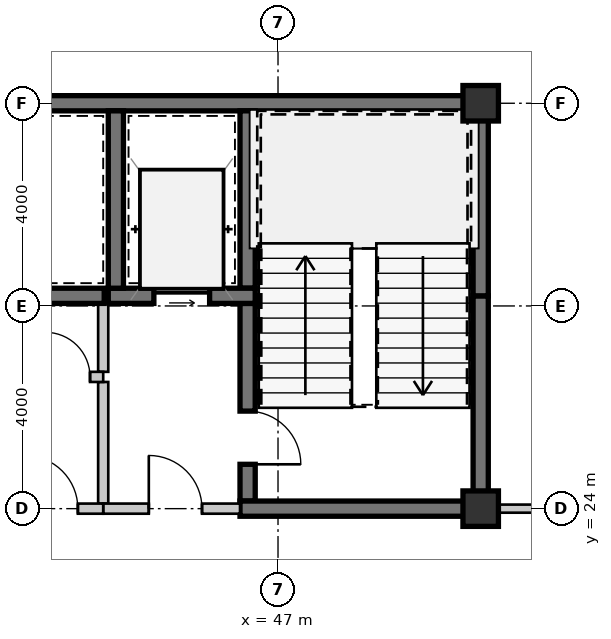
"""IFC4 building model, lengths in metres.
Left out: names, types, materials, properties, quantities, classifications, styles, units other than length and angle.
Written with IfcOpenShell. Run it as: python <this file> out.ifc"""

import sys

from ifc_helpers import new_model, si_unit, direction, frame, frame_2d, origin, origin_2d, place, context, subcontext, project, spatial, rectangle, extrude, source, transform, mapped, element, fill, save


model = new_model("IFC4")
c1 = context("Model", 3, precision=1e-05, world=origin(), true_north=direction((0.0, 1.0)))
c2 = subcontext(c1, "Body", "Model", "MODEL_VIEW")
j1 = project(units=[si_unit("LENGTHUNIT", "METRE"), si_unit("PLANEANGLEUNIT", "RADIAN")], contexts=[c1])
p1 = place(None, origin())
s1 = spatial("IfcSite", under=j1, at=p1, CompositionType="ELEMENT")
p2 = place(p1, origin())
s2 = spatial("IfcBuilding", under=s1, at=p2, CompositionType="ELEMENT")
p3 = place(p2, frame((0.0, 0.0, 65.1)))
s3 = spatial("IfcBuildingStorey", under=s2, at=p3, CompositionType="ELEMENT", Elevation=65.1)
m1 = source(origin(), c2, "Body", "SweptSolid", [
    extrude(rectangle(XDim=0.7, YDim=0.7, at=origin_2d()), origin(), (0.0, 0.0, 1.0), 3.15),
])
for number, where, z_axis, x_axis in (
    (1, (51.0, 24.0, 0.0), (0.0, 0.0, 1.0), (1.0, 0.0, 0.0)),
    (2, (51.0, 32.0, 0.0), (0.0, 0.0, 1.0), (1.0, 0.0, 0.0)),
):
    element("IfcColumn", number, at=place(p3, frame(where, z_axis=z_axis, x_axis=x_axis)), inside=s3, PredefinedType="COLUMN", context=c2, shape_type="MappedRepresentation", body=[
        mapped(m1, transform((0.0, 0.0, 0.0), scale=1.0)),
    ])
m2 = source(origin(), c2, "Body", "SweptSolid", [
    extrude(rectangle(XDim=11.95, YDim=0.3, at=frame_2d((5.975, 0.0))), origin(), (0.0, 0.0, 1.0), 2.93),
])
p4 = place(p3, frame((39.2, 32.0, 0.0), z_axis=(0.0, 0.0, 1.0), x_axis=(1.0, 0.0, 0.0)))
e3 = element("IfcWall", 3, at=p4, inside=s3, PredefinedType="SHEAR", context=c2, shape_type="MappedRepresentation", body=[
    mapped(m2, transform((0.0, 0.0, 0.0), scale=1.0)),
])
m3 = source(origin(), c2, "Body", "SweptSolid", [
    extrude(rectangle(XDim=4.05, YDim=0.3, at=frame_2d((2.025, 0.0))), origin(), (0.0, 0.0, 1.0), 2.93),
])
p5 = place(p3, frame((51.0, 24.15, 0.0), z_axis=(0.0, 0.0, 1.0), x_axis=(0.0, 1.0, 0.0)))
e4 = element("IfcWall", 4, at=p5, inside=s3, PredefinedType="SHEAR", context=c2, shape_type="MappedRepresentation", body=[
    mapped(m3, transform((0.0, 0.0, 0.0), scale=1.0)),
])
m4 = source(origin(), c2, "Body", "SweptSolid", [
    extrude(rectangle(XDim=3.65, YDim=0.3, at=frame_2d((1.825, 0.0))), origin(), (0.0, 0.0, 1.0), 2.93),
])
p6 = place(p3, frame((51.0, 28.2, 0.0), z_axis=(0.0, 0.0, 1.0), x_axis=(0.0, 1.0, 0.0)))
e5 = element("IfcWall", 5, at=p6, inside=s3, PredefinedType="SHEAR", context=c2, shape_type="MappedRepresentation", body=[
    mapped(m4, transform((0.0, 0.0, 0.0), scale=1.0)),
])
m5 = source(origin(), c2, "Body", "SweptSolid", [
    extrude(rectangle(XDim=3.5, YDim=0.3, at=frame_2d((1.75, 0.0))), origin(), (0.0, 0.0, 1.0), 2.93),
])
p7 = place(p3, frame((46.4, 31.85, 0.0), z_axis=(0.0, 0.0, 1.0), x_axis=(0.0, -1.0, 0.0)))
e6 = element("IfcWall", 6, at=p7, inside=s3, PredefinedType="SHEAR", context=c2, shape_type="MappedRepresentation", body=[
    mapped(m5, transform((0.0, 0.0, 0.0), scale=1.0)),
])
m6 = source(origin(), c2, "Body", "SweptSolid", [
    extrude(rectangle(XDim=3.9, YDim=0.3, at=frame_2d((1.95, 0.0))), origin(), (0.0, 0.0, 1.0), 2.93),
])
p8 = place(p3, frame((46.4, 28.05, 0.0), z_axis=(0.0, 0.0, 1.0), x_axis=(0.0, -1.0, 0.0)))
e7 = element("IfcWall", 7, at=p8, inside=s3, PredefinedType="SHEAR", context=c2, shape_type="MappedRepresentation", body=[
    mapped(m6, transform((0.0, 0.0, 0.0), scale=1.0)),
])
m7 = source(origin(), c2, "Body", "SweptSolid", [
    extrude(rectangle(XDim=1.05, YDim=2.1, at=frame_2d((0.525, 1.05))), frame((0.0, 0.16, 0.0), z_axis=(0.0, -1.0, 0.0), x_axis=(1.0, 0.0, 0.0)), (0.0, 0.0, 1.0), 0.32),
])
p9 = place(p8, frame((2.125, 0.0, 0.0)))
e8 = element("IfcOpeningElement", 8, at=p9, cuts=e7, PredefinedType="OPENING", context=c2, shape_type="MappedRepresentation", body=[
    mapped(m7, transform((0.0, 0.0, 0.0), scale=1.0)),
])
m8 = source(origin(), c2, "Body", "SweptSolid", [
    extrude(rectangle(XDim=4.9, YDim=0.3, at=frame_2d((2.45, 0.0))), origin(), (0.0, 0.0, 1.0), 2.93),
])
p10 = place(p3, frame((46.25, 24.0, 0.0), z_axis=(0.0, 0.0, 1.0), x_axis=(1.0, 0.0, 0.0)))
e9 = element("IfcWall", 9, at=p10, inside=s3, PredefinedType="SHEAR", context=c2, shape_type="MappedRepresentation", body=[
    mapped(m8, transform((0.0, 0.0, 0.0), scale=1.0)),
])
m9 = source(origin(), c2, "Body", "SweptSolid", [
    extrude(rectangle(XDim=2.9, YDim=0.3, at=frame_2d((1.45, 0.0))), origin(), (0.0, 0.0, 1.0), 2.93),
])
p11 = place(p3, frame((43.65, 28.2, 0.0), z_axis=(0.0, 0.0, 1.0), x_axis=(1.0, 0.0, 0.0)))
e10 = element("IfcWall", 10, at=p11, inside=s3, PredefinedType="SHEAR", context=c2, shape_type="MappedRepresentation", body=[
    mapped(m9, transform((0.0, 0.0, 0.0), scale=1.0)),
])
m10 = source(origin(), c2, "Body", "SweptSolid", [
    extrude(rectangle(XDim=1.1, YDim=2.15, at=frame_2d((0.55, 1.075))), frame((0.0, 0.16, 0.0), z_axis=(0.0, -1.0, 0.0), x_axis=(1.0, 0.0, 0.0)), (0.0, 0.0, 1.0), 0.32),
])
p12 = place(p11, frame((0.9, 0.0, 0.0)))
e11 = element("IfcOpeningElement", 11, at=p12, cuts=e10, PredefinedType="OPENING", context=c2, shape_type="MappedRepresentation", body=[
    mapped(m10, transform((0.0, 0.0, 0.0), scale=1.0)),
])
p13 = place(p3, frame((43.8, 31.85, 0.0), z_axis=(0.0, 0.0, 1.0), x_axis=(0.0, -1.0, 0.0)))
e12 = element("IfcWall", 12, at=p13, inside=s3, PredefinedType="SHEAR", context=c2, shape_type="MappedRepresentation", body=[
    mapped(m5, transform((0.0, 0.0, 0.0), scale=1.0)),
])
m11 = source(origin(), c2, "Body", "SweptSolid", [
    extrude(rectangle(XDim=2.4, YDim=0.2, at=frame_2d((1.2, 0.0))), origin(), (0.0, 0.0, 1.0), 2.93),
])
p14 = place(p3, frame((43.55, 26.5, 0.0), z_axis=(0.0, 0.0, 1.0), x_axis=(0.0, -1.0, 0.0)))
e13 = element("IfcWall", 13, at=p14, inside=s3, PredefinedType="SOLIDWALL", context=c2, shape_type="MappedRepresentation", body=[
    mapped(m11, transform((0.0, 0.0, 0.0), scale=1.0)),
])
m12 = source(origin(), c2, "Body", "SweptSolid", [
    extrude(rectangle(XDim=1.35, YDim=0.2, at=frame_2d((0.675, 0.0))), origin(), (0.0, 0.0, 1.0), 2.93),
])
p15 = place(p3, frame((43.55, 28.05, 0.0), z_axis=(0.0, 0.0, 1.0), x_axis=(0.0, -1.0, 0.0)))
e14 = element("IfcWall", 14, at=p15, inside=s3, PredefinedType="SOLIDWALL", context=c2, shape_type="MappedRepresentation", body=[
    mapped(m12, transform((0.0, 0.0, 0.0), scale=1.0)),
])
m13 = source(origin(), c2, "Body", "SweptSolid", [
    extrude(rectangle(XDim=2.7, YDim=0.2, at=frame_2d((1.35, 0.0))), origin(), (0.0, 0.0, 1.0), 2.397),
])
p16 = place(p3, frame((43.55, 24.0, 0.0), z_axis=(0.0, 0.0, 1.0), x_axis=(1.0, 0.0, 0.0)))
e15 = element("IfcWall", 15, at=p16, inside=s3, PredefinedType="SOLIDWALL", context=c2, shape_type="MappedRepresentation", body=[
    mapped(m13, transform((0.0, 0.0, 0.0), scale=1.0)),
])
m14 = source(origin(), c2, "Body", "SweptSolid", [
    extrude(rectangle(XDim=1.05, YDim=2.1, at=frame_2d((0.525, 1.05))), frame((0.0, 0.11, 0.0), z_axis=(0.0, -1.0, 0.0), x_axis=(1.0, 0.0, 0.0)), (0.0, 0.0, 1.0), 0.22),
])
p17 = place(p16, frame((0.9, 0.0, 0.0)))
e16 = element("IfcOpeningElement", 16, at=p17, cuts=e15, PredefinedType="OPENING", context=c2, shape_type="MappedRepresentation", body=[
    mapped(m14, transform((0.0, 0.0, 0.0), scale=1.0)),
])
m15 = source(origin(), c2, "Body", "SweptSolid", [
    extrude(rectangle(XDim=1.44, YDim=0.3, at=frame_2d((0.72, 0.0))), origin(), (0.0, 0.0, 1.0), 2.93),
])
p18 = place(p3, frame((42.13, 28.2, 0.0), z_axis=(0.0, 0.0, 1.0), x_axis=(1.0, 0.0, 0.0)))
e17 = element("IfcWall", 17, at=p18, inside=s3, PredefinedType="SHEAR", context=c2, shape_type="MappedRepresentation", body=[
    mapped(m15, transform((0.0, 0.0, 0.0), scale=1.0)),
])
m16 = source(origin(), c2, "Body", "SweptSolid", [
    extrude(rectangle(XDim=1.25, YDim=0.2, at=frame_2d((0.625, 0.0))), origin(), (0.0, 0.0, 1.0), 2.93),
])
p19 = place(p3, frame((42.3, 26.6, 0.0), z_axis=(0.0, 0.0, 1.0), x_axis=(1.0, 0.0, 0.0)))
e18 = element("IfcWall", 18, at=p19, inside=s3, PredefinedType="SOLIDWALL", context=c2, shape_type="MappedRepresentation", body=[
    mapped(m16, transform((0.0, 0.0, 0.0), scale=1.0)),
])
m17 = source(origin(), c2, "Body", "SweptSolid", [
    extrude(rectangle(XDim=0.88, YDim=2.1, at=frame_2d((0.44, 1.05))), frame((0.0, 0.11, 0.0), z_axis=(0.0, -1.0, 0.0), x_axis=(1.0, 0.0, 0.0)), (0.0, 0.0, 1.0), 0.22),
])
p20 = place(p19, frame((0.11, 0.0, 0.0)))
e19 = element("IfcOpeningElement", 19, at=p20, cuts=e18, PredefinedType="OPENING", context=c2, shape_type="MappedRepresentation", body=[
    mapped(m17, transform((0.0, 0.0, 0.0), scale=1.0)),
])
m18 = source(origin(), c2, "Body", "SweptSolid", [
    extrude(rectangle(XDim=2.05, YDim=0.2, at=frame_2d((1.025, 0.0))), origin(), (0.0, 0.0, 1.0), 2.397),
])
p21 = place(p3, frame((43.55, 24.0, 0.0), z_axis=(0.0, 0.0, 1.0), x_axis=(-1.0, 0.0, 0.0)))
e20 = element("IfcWall", 20, at=p21, inside=s3, PredefinedType="SOLIDWALL", context=c2, shape_type="MappedRepresentation", body=[
    mapped(m18, transform((0.0, 0.0, 0.0), scale=1.0)),
])
p22 = place(p21, frame((0.5, 0.0, 0.0)))
e21 = element("IfcOpeningElement", 21, at=p22, cuts=e20, PredefinedType="OPENING", context=c2, shape_type="MappedRepresentation", body=[
    mapped(m14, transform((0.0, 0.0, 0.0), scale=1.0)),
])
m19 = source(origin(), c2, "Body", "SweptSolid", [
    extrude(rectangle(XDim=1.155, YDim=0.16, at=frame_2d((0.577, 0.0))), origin(), (0.0, 0.0, 1.0), 2.328),
])
p23 = place(p3, frame((51.15, 24.0, 0.0), z_axis=(0.0, 0.0, 1.0), x_axis=(1.0, 0.0, 0.0)))
e22 = element("IfcWall", 22, at=p23, inside=s3, PredefinedType="PARTITIONING", context=c2, shape_type="MappedRepresentation", body=[
    mapped(m19, transform((0.0, 0.0, 0.0), scale=1.0)),
])
m20 = source(origin(), c2, "Body", "SweptSolid", [
    extrude(rectangle(XDim=1.05, YDim=2.1, at=frame_2d((0.525, 1.05))), frame((0.0, 0.025, 0.0), z_axis=(0.0, -1.0, 0.0), x_axis=(1.0, 0.0, 0.0)), (0.0, 0.0, 1.0), 0.05),
])
p24 = place(p9, origin())
e23 = element("IfcDoor", 23, at=p24, inside=s3, OperationType="SINGLE_SWING_RIGHT", PredefinedType="DOOR", context=c2, shape_type="MappedRepresentation", body=[
    mapped(m20, transform((0.0, 0.0, 0.0), scale=1.0)),
])
fill(e8, e23)
m21 = source(origin(), c2, "Body", "SweptSolid", [
    extrude(rectangle(XDim=1.1, YDim=2.15, at=frame_2d((0.55, 1.075))), frame((0.0, 0.025, 0.0), z_axis=(0.0, -1.0, 0.0), x_axis=(1.0, 0.0, 0.0)), (0.0, 0.0, 1.0), 0.05),
])
p25 = place(p12, origin())
e24 = element("IfcDoor", 24, at=p25, inside=s3, OperationType="SLIDING_TO_LEFT", PredefinedType="DOOR", context=c2, shape_type="MappedRepresentation", body=[
    mapped(m21, transform((0.0, 0.0, 0.0), scale=1.0)),
])
fill(e11, e24)
p26 = place(p17, origin())
e25 = element("IfcDoor", 25, at=p26, inside=s3, OperationType="SINGLE_SWING_LEFT", PredefinedType="DOOR", context=c2, shape_type="MappedRepresentation", body=[
    mapped(m20, transform((0.0, 0.0, 0.0), scale=1.0)),
])
fill(e16, e25)
m22 = source(origin(), c2, "Body", "SweptSolid", [
    extrude(rectangle(XDim=0.88, YDim=2.1, at=frame_2d((0.44, 1.05))), frame((0.0, 0.025, 0.0), z_axis=(0.0, -1.0, 0.0), x_axis=(1.0, 0.0, 0.0)), (0.0, 0.0, 1.0), 0.05),
])
p27 = place(p20, origin())
e26 = element("IfcDoor", 26, at=p27, inside=s3, OperationType="SINGLE_SWING_LEFT", PredefinedType="DOOR", context=c2, shape_type="MappedRepresentation", body=[
    mapped(m22, transform((0.0, 0.0, 0.0), scale=1.0)),
])
fill(e19, e26)
p28 = place(p22, frame((1.05, 0.0, 0.0), z_axis=(0.0, 0.0, 1.0), x_axis=(-1.0, 0.0, 0.0)))
e27 = element("IfcDoor", 27, at=p28, inside=s3, OperationType="SINGLE_SWING_LEFT", PredefinedType="DOOR", context=c2, shape_type="MappedRepresentation", body=[
    mapped(m20, transform((0.0, 0.0, 0.0), scale=1.0)),
])
fill(e21, e27)
save(model, sys.argv[1])
